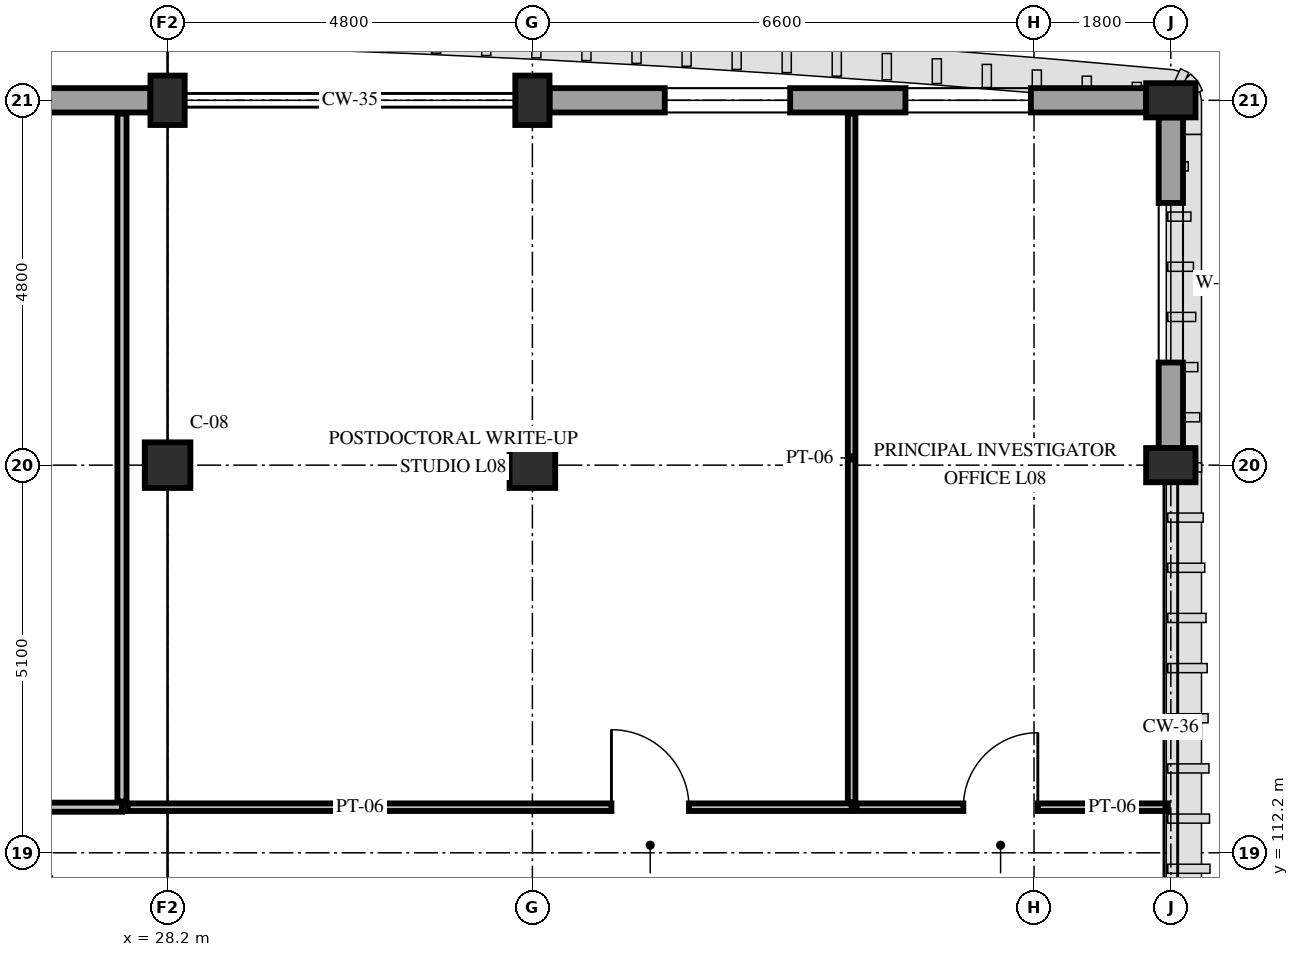
"""IFC4 building model, lengths in metres.
Left out: names, types, materials, properties, quantities, classifications, styles, units other than length and angle.
Written with IfcOpenShell. Run it as: python <this file> out.ifc"""

import sys

from ifc_helpers import new_model, si_unit, direction, frame, frame_2d, origin, origin_2d, place, context, subcontext, project, spatial, rectangle, extrude, element, fill, save


model = new_model("IFC4")
c1 = context("Model", 3, precision=1e-05, world=origin(), true_north=direction((0.0, 1.0)))
c2 = subcontext(c1, "Body", "Model", "MODEL_VIEW")
j1 = project(units=[si_unit("LENGTHUNIT", "METRE"), si_unit("PLANEANGLEUNIT", "RADIAN")], contexts=[c1])
p1 = place(None, origin())
s1 = spatial("IfcSite", under=j1, at=p1, CompositionType="ELEMENT")
p2 = place(p1, origin())
s2 = spatial("IfcBuilding", under=s1, at=p2, CompositionType="ELEMENT")
p3 = place(p2, frame((0.0, 0.0, 38.4)))
s3 = spatial("IfcBuildingStorey", under=s2, at=p3, CompositionType="ELEMENT", Elevation=38.4)
p4 = place(p3, frame((28.2, 117.3, 0.0), z_axis=(0.0, 0.0, 1.0), x_axis=(1.0, 0.0, 0.0)))
e1 = element("IfcColumn", 1, at=p4, inside=s3, PredefinedType="COLUMN", context=c2, shape_type="SweptSolid", body=[
    extrude(rectangle(XDim=0.6, YDim=0.6, at=origin_2d()), origin(), (0.0, 0.0, 1.0), 4.2),
])
p5 = place(p3, frame((28.2, 122.1, 0.0), z_axis=(0.0, 0.0, 1.0), x_axis=(1.0, 0.0, 0.0)))
e2 = element("IfcColumn", 2, at=p5, inside=s3, PredefinedType="PILASTER", context=c2, shape_type="SweptSolid", body=[
    extrude(rectangle(XDim=0.45, YDim=0.65, at=origin_2d()), origin(), (0.0, 0.0, 1.0), 4.2),
])
p6 = place(p3, frame((33.0, 117.3, 0.0), z_axis=(0.0, 0.0, 1.0), x_axis=(1.0, 0.0, 0.0)))
e3 = element("IfcColumn", 3, at=p6, inside=s3, PredefinedType="COLUMN", context=c2, shape_type="SweptSolid", body=[
    extrude(rectangle(XDim=0.6, YDim=0.6, at=origin_2d()), origin(), (0.0, 0.0, 1.0), 4.2),
])
for number, where, z_axis, x_axis in (
    (4, (33.0, 122.1, 0.0), (0.0, 0.0, 1.0), (1.0, 0.0, 0.0)),
    (5, (41.4, 117.3, 0.0), (0.0, 0.0, 1.0), (0.0, 1.0, 0.0)),
    (6, (41.4, 122.1, 0.0), (0.0, 0.0, 1.0), (0.0, 1.0, 0.0)),
):
    element("IfcColumn", number, at=place(p3, frame(where, z_axis=z_axis, x_axis=x_axis)), inside=s3, PredefinedType="PILASTER", context=c2, shape_type="SweptSolid", body=[
        extrude(rectangle(XDim=0.45, YDim=0.65, at=origin_2d()), origin(), (0.0, 0.0, 1.0), 4.2),
    ])
p7 = place(p3, frame((20.025, 122.1, 0.0), z_axis=(0.0, 0.0, 1.0), x_axis=(1.0, 0.0, 0.0)))
e7 = element("IfcWall", 7, at=p7, inside=s3, PredefinedType="STANDARD", context=c2, shape_type="SweptSolid", body=[
    extrude(rectangle(XDim=7.95, YDim=0.32, at=frame_2d((3.975, 0.0))), origin(), (0.0, 0.0, 1.0), 3.33),
])
p8 = place(p7, frame((1.55, 0.0, 0.85)))
e8 = element("IfcOpeningElement", 8, at=p8, cuts=e7, PredefinedType="OPENING", context=c2, shape_type="SweptSolid", body=[
    extrude(rectangle(XDim=1.65, YDim=2.08, at=frame_2d((0.825, 1.04))), frame((0.0, 0.175, 0.0), z_axis=(0.0, -1.0, 0.0), x_axis=(1.0, 0.0, 0.0)), (0.0, 0.0, 1.0), 0.35),
])
p9 = place(p7, frame((4.75, 0.0, 0.85)))
e9 = element("IfcOpeningElement", 9, at=p9, cuts=e7, PredefinedType="OPENING", context=c2, shape_type="SweptSolid", body=[
    extrude(rectangle(XDim=1.65, YDim=2.08, at=frame_2d((0.825, 1.04))), frame((0.0, 0.175, 0.0), z_axis=(0.0, -1.0, 0.0), x_axis=(1.0, 0.0, 0.0)), (0.0, 0.0, 1.0), 0.35),
])
p10 = place(p3, frame((33.225, 122.1, 0.0), z_axis=(0.0, 0.0, 1.0), x_axis=(1.0, 0.0, 0.0)))
e10 = element("IfcWall", 10, at=p10, inside=s3, PredefinedType="STANDARD", context=c2, shape_type="SweptSolid", body=[
    extrude(rectangle(XDim=7.85, YDim=0.32, at=frame_2d((3.925, 0.0))), origin(), (0.0, 0.0, 1.0), 3.33),
])
p11 = place(p10, frame((1.517, 0.0, 0.85)))
e11 = element("IfcOpeningElement", 11, at=p11, cuts=e10, PredefinedType="OPENING", context=c2, shape_type="SweptSolid", body=[
    extrude(rectangle(XDim=1.65, YDim=2.08, at=frame_2d((0.825, 1.04))), frame((0.0, 0.175, 0.0), z_axis=(0.0, -1.0, 0.0), x_axis=(1.0, 0.0, 0.0)), (0.0, 0.0, 1.0), 0.35),
])
p12 = place(p10, frame((4.683, 0.0, 0.85)))
e12 = element("IfcOpeningElement", 12, at=p12, cuts=e10, PredefinedType="OPENING", context=c2, shape_type="SweptSolid", body=[
    extrude(rectangle(XDim=1.65, YDim=2.08, at=frame_2d((0.825, 1.04))), frame((0.0, 0.175, 0.0), z_axis=(0.0, -1.0, 0.0), x_axis=(1.0, 0.0, 0.0)), (0.0, 0.0, 1.0), 0.35),
])
p13 = place(p3, frame((41.4, 121.875, 0.0), z_axis=(0.0, 0.0, 1.0), x_axis=(0.0, -1.0, 0.0)))
e13 = element("IfcWall", 13, at=p13, inside=s3, PredefinedType="STANDARD", context=c2, shape_type="SweptSolid", body=[
    extrude(rectangle(XDim=4.35, YDim=0.32, at=frame_2d((2.175, 0.0))), origin(), (0.0, 0.0, 1.0), 3.23),
])
p14 = place(p13, frame((1.125, 0.0, 0.85)))
e14 = element("IfcOpeningElement", 14, at=p14, cuts=e13, PredefinedType="OPENING", context=c2, shape_type="SweptSolid", body=[
    extrude(rectangle(XDim=2.1, YDim=2.08, at=frame_2d((1.05, 1.04))), frame((0.0, 0.175, 0.0), z_axis=(0.0, -1.0, 0.0), x_axis=(1.0, 0.0, 0.0)), (0.0, 0.0, 1.0), 0.35),
])
p15 = place(p3, frame((18.275, 112.8, 0.0), z_axis=(0.0, 0.0, 1.0), x_axis=(1.0, 0.0, 0.0)))
e15 = element("IfcWall", 15, at=p15, inside=s3, PredefinedType="PARTITIONING", context=c2, shape_type="SweptSolid", body=[
    extrude(rectangle(XDim=9.325, YDim=0.12, at=frame_2d((4.663, 0.0))), origin(), (0.0, 0.0, 1.0), 3.53),
])
p16 = place(p15, frame((3.785, 0.0, 0.0)))
e16 = element("IfcOpeningElement", 16, at=p16, cuts=e15, PredefinedType="OPENING", context=c2, shape_type="SweptSolid", body=[
    extrude(rectangle(XDim=1.68, YDim=2.3, at=frame_2d((0.84, 1.15))), frame((0.0, 0.075, 0.0), z_axis=(0.0, -1.0, 0.0), x_axis=(1.0, 0.0, 0.0)), (0.0, 0.0, 1.0), 0.15),
])
p17 = place(p3, frame((27.6, 112.875, 0.0), z_axis=(0.0, 0.0, 1.0), x_axis=(0.0, 1.0, 0.0)))
e17 = element("IfcWall", 17, at=p17, inside=s3, PredefinedType="PARTITIONING", context=c2, shape_type="SweptSolid", body=[
    extrude(rectangle(XDim=9.05, YDim=0.12, at=frame_2d((4.525, 0.0))), origin(), (0.0, 0.0, 1.0), 3.23),
])
p18 = place(p3, frame((27.675, 112.8, 0.0), z_axis=(0.0, 0.0, 1.0), x_axis=(1.0, 0.0, 0.0)))
e18 = element("IfcWall", 18, at=p18, inside=s3, PredefinedType="PARTITIONING", context=c2, shape_type="SweptSolid", body=[
    extrude(rectangle(XDim=9.525, YDim=0.1, at=frame_2d((4.762, 0.0))), origin(), (0.0, 0.0, 1.0), 3.53),
])
p19 = place(p18, frame((6.365, 0.0, 0.0)))
e19 = element("IfcOpeningElement", 19, at=p19, cuts=e18, PredefinedType="OPENING", context=c2, shape_type="SweptSolid", body=[
    extrude(rectangle(XDim=1.02, YDim=2.2, at=frame_2d((0.51, 1.1))), frame((0.0, 0.065, 0.0), z_axis=(0.0, -1.0, 0.0), x_axis=(1.0, 0.0, 0.0)), (0.0, 0.0, 1.0), 0.13),
])
p20 = place(p3, frame((37.2, 112.865, 0.0), z_axis=(0.0, 0.0, 1.0), x_axis=(0.0, 1.0, 0.0)))
e20 = element("IfcWall", 20, at=p20, inside=s3, PredefinedType="PARTITIONING", context=c2, shape_type="SweptSolid", body=[
    extrude(rectangle(XDim=9.06, YDim=0.1, at=frame_2d((4.53, 0.0))), origin(), (0.0, 0.0, 1.0), 3.23),
])
p21 = place(p3, frame((37.265, 112.8, 0.0), z_axis=(0.0, 0.0, 1.0), x_axis=(1.0, 0.0, 0.0)))
e21 = element("IfcWall", 21, at=p21, inside=s3, PredefinedType="PARTITIONING", context=c2, shape_type="SweptSolid", body=[
    extrude(rectangle(XDim=4.095, YDim=0.1, at=frame_2d((2.048, 0.0))), origin(), (0.0, 0.0, 1.0), 3.48),
])
p22 = place(p21, frame((1.405, 0.0, 0.0)))
e22 = element("IfcOpeningElement", 22, at=p22, cuts=e21, PredefinedType="OPENING", context=c2, shape_type="SweptSolid", body=[
    extrude(rectangle(XDim=0.98, YDim=2.2, at=frame_2d((0.49, 1.1))), frame((0.0, 0.065, 0.0), z_axis=(0.0, -1.0, 0.0), x_axis=(1.0, 0.0, 0.0)), (0.0, 0.0, 1.0), 0.13),
])
p23 = place(p11, origin())
e23 = element("IfcWindow", 23, at=p23, inside=s3, PartitioningType="SINGLE_PANEL", PredefinedType="WINDOW", context=c2, shape_type="SweptSolid", body=[
    extrude(rectangle(XDim=1.65, YDim=2.08, at=frame_2d((0.825, 1.04))), frame((0.0, 0.03, 0.0), z_axis=(0.0, -1.0, 0.0), x_axis=(1.0, 0.0, 0.0)), (0.0, 0.0, 1.0), 0.06),
])
fill(e11, e23)
p24 = place(p12, origin())
e24 = element("IfcWindow", 24, at=p24, inside=s3, PartitioningType="SINGLE_PANEL", PredefinedType="WINDOW", context=c2, shape_type="SweptSolid", body=[
    extrude(rectangle(XDim=1.65, YDim=2.08, at=frame_2d((0.825, 1.04))), frame((0.0, 0.03, 0.0), z_axis=(0.0, -1.0, 0.0), x_axis=(1.0, 0.0, 0.0)), (0.0, 0.0, 1.0), 0.06),
])
fill(e12, e24)
p25 = place(p14, origin())
e25 = element("IfcWindow", 25, at=p25, inside=s3, PartitioningType="DOUBLE_PANEL_VERTICAL", PredefinedType="WINDOW", context=c2, shape_type="SweptSolid", body=[
    extrude(rectangle(XDim=2.1, YDim=2.08, at=frame_2d((1.05, 1.04))), frame((0.0, 0.03, 0.0), z_axis=(0.0, -1.0, 0.0), x_axis=(1.0, 0.0, 0.0)), (0.0, 0.0, 1.0), 0.06),
])
fill(e14, e25)
p26 = place(p19, origin())
e26 = element("IfcDoor", 26, at=p26, inside=s3, OperationType="SINGLE_SWING_LEFT", PredefinedType="DOOR", context=c2, shape_type="SweptSolid", body=[
    extrude(rectangle(XDim=1.02, YDim=2.2, at=frame_2d((0.51, 1.1))), frame((0.0, 0.025, 0.0), z_axis=(0.0, -1.0, 0.0), x_axis=(1.0, 0.0, 0.0)), (0.0, 0.0, 1.0), 0.05),
])
fill(e19, e26)
p27 = place(p22, origin())
e27 = element("IfcDoor", 27, at=p27, inside=s3, OperationType="SINGLE_SWING_RIGHT", PredefinedType="DOOR", context=c2, shape_type="SweptSolid", body=[
    extrude(rectangle(XDim=0.98, YDim=2.2, at=frame_2d((0.49, 1.1))), frame((0.0, 0.025, 0.0), z_axis=(0.0, -1.0, 0.0), x_axis=(1.0, 0.0, 0.0)), (0.0, 0.0, 1.0), 0.05),
])
fill(e22, e27)
save(model, sys.argv[1])
